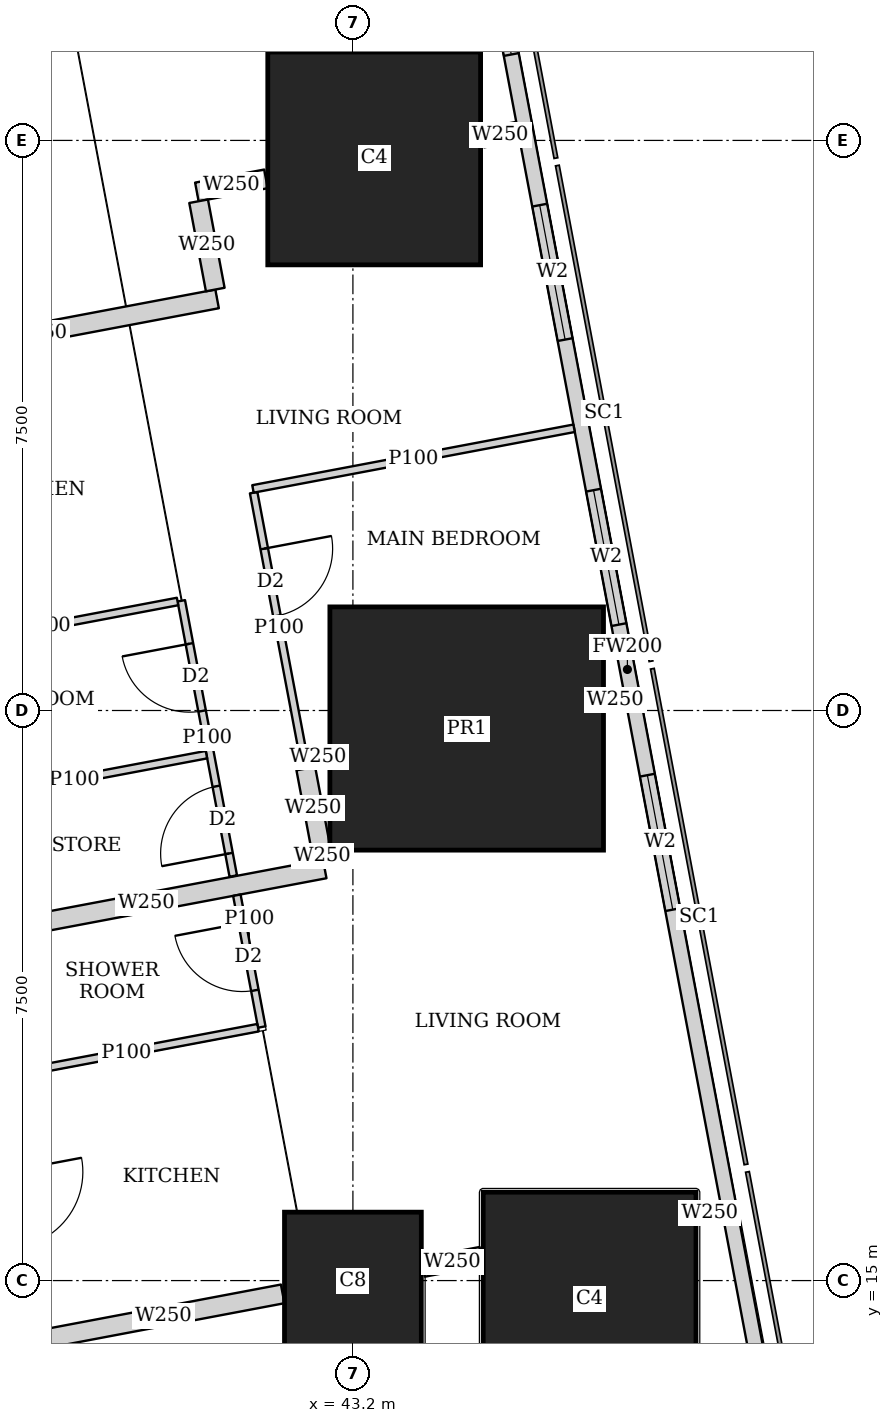
"""IFC4 building model, lengths in metres.
Left out: names, types, materials, properties, quantities, classifications, styles, units other than length and angle.
Written with IfcOpenShell. Run it as: python <this file> out.ifc"""

import sys

from ifc_helpers import new_model, si_unit, direction, frame, frame_2d, origin, origin_2d, place, context, subcontext, project, spatial, rectangle, extrude, element, fill, save


model = new_model("IFC4")
c1 = context("Model", 3, precision=1e-05, world=origin(), true_north=direction((0.0, 1.0)))
c2 = subcontext(c1, "Body", "Model", "MODEL_VIEW")
j1 = project(units=[si_unit("LENGTHUNIT", "METRE"), si_unit("PLANEANGLEUNIT", "RADIAN")], contexts=[c1])
p1 = place(None, origin())
s1 = spatial("IfcSite", under=j1, at=p1, CompositionType="ELEMENT")
p2 = place(p1, origin())
s2 = spatial("IfcBuilding", under=s1, at=p2, CompositionType="ELEMENT")
p3 = place(p2, frame((0.0, 0.0, 65.0)))
s3 = spatial("IfcBuildingStorey", under=s2, at=p3, CompositionType="ELEMENT", Elevation=65.0)
p4 = place(p3, frame((43.2, 15.0, 0.0), z_axis=(0.0, 0.0, 1.0), x_axis=(1.0, 0.0, 0.0)))
e1 = element("IfcColumn", 1, at=p4, inside=s3, PredefinedType="COLUMN", context=c2, shape_type="SweptSolid", body=[
    extrude(rectangle(XDim=1.8, YDim=1.8, at=origin_2d()), origin(), (0.0, 0.0, 1.0), 3.75),
])
p5 = place(p3, frame((46.314, 14.763, 0.0), z_axis=(0.0, 0.0, 1.0), x_axis=(1.0, 0.0, 0.0)))
e2 = element("IfcColumn", 2, at=p5, inside=s3, PredefinedType="COLUMN", context=c2, shape_type="SweptSolid", body=[
    extrude(rectangle(XDim=2.8, YDim=2.8, at=origin_2d()), origin(), (0.0, 0.0, 1.0), 3.75),
])
p6 = place(p3, frame((44.697, 22.263, 0.0), z_axis=(0.0, 0.0, 1.0), x_axis=(1.0, 0.0, 0.0)))
e3 = element("IfcColumn", 3, at=p6, inside=s3, PredefinedType="COLUMN", context=c2, shape_type="SweptSolid", body=[
    extrude(rectangle(XDim=3.6, YDim=3.2, at=origin_2d()), origin(), (0.0, 0.0, 1.0), 3.75),
])
p7 = place(p3, frame((43.48, 29.763, 0.0), z_axis=(0.0, 0.0, 1.0), x_axis=(1.0, 0.0, 0.0)))
e4 = element("IfcColumn", 4, at=p7, inside=s3, PredefinedType="COLUMN", context=c2, shape_type="SweptSolid", body=[
    extrude(rectangle(XDim=2.8, YDim=2.8, at=origin_2d()), origin(), (0.0, 0.0, 1.0), 3.75),
])
p8 = place(p3, frame((50.653, 2.703, 0.0), z_axis=(0.0, 0.0, 1.0), x_axis=(-0.185612026696, 0.982623109613, 0.0)))
e5 = element("IfcWall", 5, at=p8, inside=s3, PredefinedType="SOLIDWALL", context=c2, shape_type="SweptSolid", body=[
    extrude(rectangle(XDim=41.393, YDim=0.2, at=frame_2d((20.697, 0.0))), origin(), (0.0, 0.0, 1.0), 3.5),
])
p9 = place(p8, frame((1.633, 0.0, 0.9)))
e6 = element("IfcOpeningElement", 6, at=p9, cuts=e5, PredefinedType="OPENING", context=c2, shape_type="SweptSolid", body=[
    extrude(rectangle(XDim=1.8, YDim=1.5, at=frame_2d((0.9, 0.75))), frame((0.0, 0.11, 0.0), z_axis=(0.0, -1.0, 0.0), x_axis=(1.0, 0.0, 0.0)), (0.0, 0.0, 1.0), 0.22),
])
p10 = place(p8, frame((6.032, 0.0, 0.9)))
e7 = element("IfcOpeningElement", 7, at=p10, cuts=e5, PredefinedType="OPENING", context=c2, shape_type="SweptSolid", body=[
    extrude(rectangle(XDim=1.8, YDim=1.5, at=frame_2d((0.9, 0.75))), frame((0.0, 0.11, 0.0), z_axis=(0.0, -1.0, 0.0), x_axis=(1.0, 0.0, 0.0)), (0.0, 0.0, 1.0), 0.22),
])
p11 = place(p8, frame((9.848, 0.0, 0.9)))
e8 = element("IfcOpeningElement", 8, at=p11, cuts=e5, PredefinedType="OPENING", context=c2, shape_type="SweptSolid", body=[
    extrude(rectangle(XDim=1.8, YDim=1.5, at=frame_2d((0.9, 0.75))), frame((0.0, 0.11, 0.0), z_axis=(0.0, -1.0, 0.0), x_axis=(1.0, 0.0, 0.0)), (0.0, 0.0, 1.0), 0.22),
])
p12 = place(p8, frame((17.481, 0.0, 0.9)))
e9 = element("IfcOpeningElement", 9, at=p12, cuts=e5, PredefinedType="OPENING", context=c2, shape_type="SweptSolid", body=[
    extrude(rectangle(XDim=1.8, YDim=1.5, at=frame_2d((0.9, 0.75))), frame((0.0, 0.11, 0.0), z_axis=(0.0, -1.0, 0.0), x_axis=(1.0, 0.0, 0.0)), (0.0, 0.0, 1.0), 0.22),
])
p13 = place(p8, frame((21.297, 0.0, 0.9)))
e10 = element("IfcOpeningElement", 10, at=p13, cuts=e5, PredefinedType="OPENING", context=c2, shape_type="SweptSolid", body=[
    extrude(rectangle(XDim=1.8, YDim=1.5, at=frame_2d((0.9, 0.75))), frame((0.0, 0.11, 0.0), z_axis=(0.0, -1.0, 0.0), x_axis=(1.0, 0.0, 0.0)), (0.0, 0.0, 1.0), 0.22),
])
p14 = place(p8, frame((25.113, 0.0, 0.9)))
e11 = element("IfcOpeningElement", 11, at=p14, cuts=e5, PredefinedType="OPENING", context=c2, shape_type="SweptSolid", body=[
    extrude(rectangle(XDim=1.8, YDim=1.5, at=frame_2d((0.9, 0.75))), frame((0.0, 0.11, 0.0), z_axis=(0.0, -1.0, 0.0), x_axis=(1.0, 0.0, 0.0)), (0.0, 0.0, 1.0), 0.22),
])
p15 = place(p8, frame((28.93, 0.0, 0.9)))
e12 = element("IfcOpeningElement", 12, at=p15, cuts=e5, PredefinedType="OPENING", context=c2, shape_type="SweptSolid", body=[
    extrude(rectangle(XDim=1.8, YDim=1.5, at=frame_2d((0.9, 0.75))), frame((0.0, 0.11, 0.0), z_axis=(0.0, -1.0, 0.0), x_axis=(1.0, 0.0, 0.0)), (0.0, 0.0, 1.0), 0.22),
])
p16 = place(p8, frame((32.746, 0.0, 0.9)))
e13 = element("IfcOpeningElement", 13, at=p16, cuts=e5, PredefinedType="OPENING", context=c2, shape_type="SweptSolid", body=[
    extrude(rectangle(XDim=1.8, YDim=1.5, at=frame_2d((0.9, 0.75))), frame((0.0, 0.11, 0.0), z_axis=(0.0, -1.0, 0.0), x_axis=(1.0, 0.0, 0.0)), (0.0, 0.0, 1.0), 0.22),
])
p17 = place(p8, frame((36.481, 0.0, 0.9)))
e14 = element("IfcOpeningElement", 14, at=p17, cuts=e5, PredefinedType="OPENING", context=c2, shape_type="SweptSolid", body=[
    extrude(rectangle(XDim=1.8, YDim=1.5, at=frame_2d((0.9, 0.75))), frame((0.0, 0.11, 0.0), z_axis=(0.0, -1.0, 0.0), x_axis=(1.0, 0.0, 0.0)), (0.0, 0.0, 1.0), 0.22),
])
p18 = place(p3, frame((33.68, 42.723, 0.0), z_axis=(0.0, 0.0, 1.0), x_axis=(0.185624129307, -0.98262082342, 0.0)))
e15 = element("IfcWall", 15, at=p18, inside=s3, PredefinedType="SOLIDWALL", context=c2, shape_type="SweptSolid", body=[
    extrude(rectangle(XDim=41.051, YDim=0.15, at=frame_2d((20.526, 0.0))), origin(), (0.0, 0.0, 1.0), 2.5),
])
p19 = place(p18, frame((13.577, 0.0, 0.0)))
e16 = element("IfcOpeningElement", 16, at=p19, cuts=e15, PredefinedType="OPENING", context=c2, shape_type="SweptSolid", body=[
    extrude(rectangle(XDim=1.0, YDim=2.1, at=frame_2d((0.5, 1.05))), frame((0.0, 0.085, 0.0), z_axis=(0.0, -1.0, 0.0), x_axis=(1.0, 0.0, 0.0)), (0.0, 0.0, 1.0), 0.17),
])
p20 = place(p18, frame((17.394, 0.0, 0.0)))
e17 = element("IfcOpeningElement", 17, at=p20, cuts=e15, PredefinedType="OPENING", context=c2, shape_type="SweptSolid", body=[
    extrude(rectangle(XDim=1.0, YDim=2.1, at=frame_2d((0.5, 1.05))), frame((0.0, 0.085, 0.0), z_axis=(0.0, -1.0, 0.0), x_axis=(1.0, 0.0, 0.0)), (0.0, 0.0, 1.0), 0.17),
])
p21 = place(p18, frame((26.758, 0.0, 0.0)))
e18 = element("IfcOpeningElement", 18, at=p21, cuts=e15, PredefinedType="OPENING", context=c2, shape_type="SweptSolid", body=[
    extrude(rectangle(XDim=1.0, YDim=2.1, at=frame_2d((0.5, 1.05))), frame((0.0, 0.085, 0.0), z_axis=(0.0, -1.0, 0.0), x_axis=(1.0, 0.0, 0.0)), (0.0, 0.0, 1.0), 0.17),
])
p22 = place(p18, frame((32.193, 0.0, 0.0)))
e19 = element("IfcOpeningElement", 19, at=p22, cuts=e15, PredefinedType="OPENING", context=c2, shape_type="SweptSolid", body=[
    extrude(rectangle(XDim=1.0, YDim=2.1, at=frame_2d((0.5, 1.05))), frame((0.0, 0.085, 0.0), z_axis=(0.0, -1.0, 0.0), x_axis=(1.0, 0.0, 0.0)), (0.0, 0.0, 1.0), 0.17),
])
p23 = place(p3, frame((39.525, 31.443, 0.0), z_axis=(0.0, 0.0, 1.0), x_axis=(-0.982648035033, -0.185480023848, 0.0)))
e20 = element("IfcWall", 20, at=p23, inside=s3, PredefinedType="PARTITIONING", context=c2, shape_type="SweptSolid", body=[
    extrude(rectangle(XDim=3.575, YDim=0.1, at=frame_2d((1.788, 0.0))), origin(), (0.0, 0.0, 1.0), 3.5),
])
p24 = place(p3, frame((41.894, 25.366, 0.0), z_axis=(0.0, 0.0, 1.0), x_axis=(0.185611839851, -0.982623144907, 0.0)))
e21 = element("IfcWall", 21, at=p24, inside=s3, PredefinedType="PARTITIONING", context=c2, shape_type="SweptSolid", body=[
    extrude(rectangle(XDim=3.62, YDim=0.1, at=frame_2d((1.81, 0.0))), origin(), (0.0, 0.0, 1.0), 2.5),
])
p25 = place(p24, frame((0.75, 0.0, 0.0)))
e22 = element("IfcOpeningElement", 22, at=p25, cuts=e21, PredefinedType="OPENING", context=c2, shape_type="SweptSolid", body=[
    extrude(rectangle(XDim=0.9, YDim=2.1, at=frame_2d((0.45, 1.05))), frame((0.0, 0.06, 0.0), z_axis=(0.0, -1.0, 0.0), x_axis=(1.0, 0.0, 0.0)), (0.0, 0.0, 1.0), 0.12),
])
p26 = place(p3, frame((40.942, 23.943, 0.0), z_axis=(0.0, 0.0, 1.0), x_axis=(0.185632361754, -0.982619268216, 0.0)))
e23 = element("IfcWall", 23, at=p26, inside=s3, PredefinedType="PARTITIONING", context=c2, shape_type="SweptSolid", body=[
    extrude(rectangle(XDim=3.685, YDim=0.1, at=frame_2d((1.843, 0.0))), origin(), (0.0, 0.0, 1.0), 2.5),
])
p27 = place(p26, frame((0.575, 0.0, 0.0)))
e24 = element("IfcOpeningElement", 24, at=p27, cuts=e23, PredefinedType="OPENING", context=c2, shape_type="SweptSolid", body=[
    extrude(rectangle(XDim=0.9, YDim=2.1, at=frame_2d((0.45, 1.05))), frame((0.0, 0.06, 0.0), z_axis=(0.0, -1.0, 0.0), x_axis=(1.0, 0.0, 0.0)), (0.0, 0.0, 1.0), 0.12),
])
p28 = place(p26, frame((2.483, 0.0, 0.0)))
e25 = element("IfcOpeningElement", 25, at=p28, cuts=e23, PredefinedType="OPENING", context=c2, shape_type="SweptSolid", body=[
    extrude(rectangle(XDim=0.9, YDim=2.1, at=frame_2d((0.45, 1.05))), frame((0.0, 0.06, 0.0), z_axis=(0.0, -1.0, 0.0), x_axis=(1.0, 0.0, 0.0)), (0.0, 0.0, 1.0), 0.12),
])
p29 = place(p3, frame((46.11, 26.213, 0.0), z_axis=(0.0, 0.0, 1.0), x_axis=(-0.982633535512, -0.185556823879, 0.0)))
e26 = element("IfcWall", 26, at=p29, inside=s3, PredefinedType="PARTITIONING", context=c2, shape_type="SweptSolid", body=[
    extrude(rectangle(XDim=4.3, YDim=0.1, at=frame_2d((2.15, 0.0))), origin(), (0.0, 0.0, 1.0), 2.05),
])
p30 = place(p3, frame((40.893, 23.934, 0.0), z_axis=(0.0, 0.0, 1.0), x_axis=(-0.982588017646, -0.185797706064, 0.0)))
e27 = element("IfcWall", 27, at=p30, inside=s3, PredefinedType="PARTITIONING", context=c2, shape_type="SweptSolid", body=[
    extrude(rectangle(XDim=3.525, YDim=0.1, at=frame_2d((1.763, 0.0))), origin(), (0.0, 0.0, 1.0), 3.5),
])
p31 = place(p3, frame((41.273, 21.919, 0.0), z_axis=(0.0, 0.0, 1.0), x_axis=(-0.982636169624, -0.185542874149, 0.0)))
e28 = element("IfcWall", 28, at=p31, inside=s3, PredefinedType="PARTITIONING", context=c2, shape_type="SweptSolid", body=[
    extrude(rectangle(XDim=3.525, YDim=0.1, at=frame_2d((1.763, 0.0))), origin(), (0.0, 0.0, 1.0), 2.5),
])
p32 = place(p3, frame((45.372, 30.121, 0.0), z_axis=(0.0, 0.0, 1.0), x_axis=(-0.982352019699, -0.187041464366, 0.0)))
e29 = element("IfcWall", 29, at=p32, inside=s3, PredefinedType="SOLIDWALL", context=c2, shape_type="SweptSolid", body=[
    extrude(rectangle(XDim=0.476, YDim=0.25, at=frame_2d((0.238, 0.0))), origin(), (0.0, 0.0, 1.0), 3.5),
])
p33 = place(p3, frame((42.056, 29.494, 0.0), z_axis=(0.0, 0.0, 1.0), x_axis=(-0.982587178881, -0.185802141803, 0.0)))
e30 = element("IfcWall", 30, at=p33, inside=s3, PredefinedType="SOLIDWALL", context=c2, shape_type="SweptSolid", body=[
    extrude(rectangle(XDim=0.925, YDim=0.25, at=frame_2d((0.462, 0.0))), origin(), (0.0, 0.0, 1.0), 2.5),
])
p34 = place(p3, frame((41.413, 27.915, 0.0), z_axis=(0.0, 0.0, 1.0), x_axis=(-0.982635807605, -0.185544791394, 0.0)))
e31 = element("IfcWall", 31, at=p34, inside=s3, PredefinedType="SOLIDWALL", context=c2, shape_type="SweptSolid", body=[
    extrude(rectangle(XDim=4.775, YDim=0.25, at=frame_2d((2.388, 0.0))), origin(), (0.0, 0.0, 1.0), 3.5),
])
p35 = place(p3, frame((41.17, 29.2, 0.0), z_axis=(0.0, 0.0, 1.0), x_axis=(0.185223510709, -0.982696418575, 0.0)))
e32 = element("IfcWall", 32, at=p35, inside=s3, PredefinedType="SOLIDWALL", context=c2, shape_type="SweptSolid", body=[
    extrude(rectangle(XDim=1.182, YDim=0.25, at=frame_2d((0.591, 0.0))), origin(), (0.0, 0.0, 1.0), 2.5),
])
p36 = place(p3, frame((41.673, 20.07, 0.0), z_axis=(0.0, 0.0, 1.0), x_axis=(0.185783379659, -0.98259072652, 0.0)))
e33 = element("IfcWall", 33, at=p36, inside=s3, PredefinedType="PARTITIONING", context=c2, shape_type="SweptSolid", body=[
    extrude(rectangle(XDim=1.765, YDim=0.1, at=frame_2d((0.882, 0.0))), origin(), (0.0, 0.0, 1.0), 3.5),
])
p37 = place(p36, frame((0.374, 0.0, 0.0)))
e34 = element("IfcOpeningElement", 34, at=p37, cuts=e33, PredefinedType="OPENING", context=c2, shape_type="SweptSolid", body=[
    extrude(rectangle(XDim=0.9, YDim=2.1, at=frame_2d((0.45, 1.05))), frame((0.0, 0.06, 0.0), z_axis=(0.0, -1.0, 0.0), x_axis=(1.0, 0.0, 0.0)), (0.0, 0.0, 1.0), 0.12),
])
p38 = place(p3, frame((41.952, 18.327, 0.0), z_axis=(0.0, 0.0, 1.0), x_axis=(-0.982648794755, -0.185475998897, 0.0)))
e35 = element("IfcWall", 35, at=p38, inside=s3, PredefinedType="PARTITIONING", context=c2, shape_type="SweptSolid", body=[
    extrude(rectangle(XDim=3.525, YDim=0.1, at=frame_2d((1.763, 0.0))), origin(), (0.0, 0.0, 1.0), 3.5),
])
p39 = place(p3, frame((46.782, 22.657, 0.0), z_axis=(0.0, 0.0, 1.0), x_axis=(-0.982778390997, -0.18478807913, 0.0)))
e36 = element("IfcWall", 36, at=p39, inside=s3, PredefinedType="SOLIDWALL", context=c2, shape_type="SweptSolid", body=[
    extrude(rectangle(XDim=0.266, YDim=0.25, at=frame_2d((0.133, 0.0))), origin(), (0.0, 0.0, 1.0), 3.5),
])
p40 = place(p3, frame((42.873, 21.918, 0.0), z_axis=(0.0, 0.0, 1.0), x_axis=(-0.982892522967, -0.184180043152, 0.0)))
e37 = element("IfcWall", 37, at=p40, inside=s3, PredefinedType="SOLIDWALL", context=c2, shape_type="SweptSolid", body=[
    extrude(rectangle(XDim=0.272, YDim=0.25, at=frame_2d((0.136, 0.0))), origin(), (0.0, 0.0, 1.0), 2.5),
])
p41 = place(p3, frame((42.829, 20.416, 0.0), z_axis=(0.0, 0.0, 1.0), x_axis=(-0.982635807605, -0.185544791394, 0.0)))
e38 = element("IfcWall", 38, at=p41, inside=s3, PredefinedType="SOLIDWALL", context=c2, shape_type="SweptSolid", body=[
    extrude(rectangle(XDim=4.775, YDim=0.25, at=frame_2d((2.388, 0.0))), origin(), (0.0, 0.0, 1.0), 3.5),
])
p42 = place(p3, frame((42.58, 21.736, 0.0), z_axis=(0.0, 0.0, 1.0), x_axis=(0.185458925981, -0.982652017132, 0.0)))
e39 = element("IfcWall", 39, at=p42, inside=s3, PredefinedType="SOLIDWALL", context=c2, shape_type="SweptSolid", body=[
    extrude(rectangle(XDim=1.045, YDim=0.25, at=frame_2d((0.522, 0.0))), origin(), (0.0, 0.0, 1.0), 2.5),
])
p43 = place(p3, frame((42.787, 20.639, 0.0), z_axis=(0.0, 0.0, 1.0), x_axis=(0.185013851593, -0.982735913009, 0.0)))
e40 = element("IfcWall", 40, at=p43, inside=s3, PredefinedType="SOLIDWALL", context=c2, shape_type="SweptSolid", body=[
    extrude(rectangle(XDim=0.102, YDim=0.25, at=frame_2d((0.051, 0.0))), origin(), (0.0, 0.0, 1.0), 3.5),
])
p44 = place(p3, frame((48.055, 15.917, 0.0), z_axis=(0.0, 0.0, 1.0), x_axis=(-0.982510408223, -0.186207673669, 0.0)))
e41 = element("IfcWall", 41, at=p44, inside=s3, PredefinedType="SOLIDWALL", context=c2, shape_type="SweptSolid", body=[
    extrude(rectangle(XDim=0.323, YDim=0.25, at=frame_2d((0.161, 0.0))), origin(), (0.0, 0.0, 1.0), 3.5),
])
p45 = place(p3, frame((44.89, 15.319, 0.0), z_axis=(0.0, 0.0, 1.0), x_axis=(-0.982540856152, -0.186046945666, 0.0)))
e42 = element("IfcWall", 42, at=p45, inside=s3, PredefinedType="SOLIDWALL", context=c2, shape_type="SweptSolid", body=[
    extrude(rectangle(XDim=0.78, YDim=0.25, at=frame_2d((0.39, 0.0))), origin(), (0.0, 0.0, 1.0), 2.05),
])
p46 = place(p3, frame((42.276, 14.825, 0.0), z_axis=(0.0, 0.0, 1.0), x_axis=(-0.982607211054, -0.185696173318, 0.0)))
e43 = element("IfcWall", 43, at=p46, inside=s3, PredefinedType="SOLIDWALL", context=c2, shape_type="SweptSolid", body=[
    extrude(rectangle(XDim=3.194, YDim=0.25, at=frame_2d((1.597, 0.0))), origin(), (0.0, 0.0, 1.0), 3.5),
])
p47 = place(p12, origin())
e44 = element("IfcWindow", 44, at=p47, inside=s3, PartitioningType="SINGLE_PANEL", PredefinedType="WINDOW", context=c2, shape_type="SweptSolid", body=[
    extrude(rectangle(XDim=1.8, YDim=1.5, at=frame_2d((0.9, 0.75))), frame((0.0, 0.03, 0.0), z_axis=(0.0, -1.0, 0.0), x_axis=(1.0, 0.0, 0.0)), (0.0, 0.0, 1.0), 0.06),
])
fill(e9, e44)
p48 = place(p13, origin())
e45 = element("IfcWindow", 45, at=p48, inside=s3, PartitioningType="SINGLE_PANEL", PredefinedType="WINDOW", context=c2, shape_type="SweptSolid", body=[
    extrude(rectangle(XDim=1.8, YDim=1.5, at=frame_2d((0.9, 0.75))), frame((0.0, 0.03, 0.0), z_axis=(0.0, -1.0, 0.0), x_axis=(1.0, 0.0, 0.0)), (0.0, 0.0, 1.0), 0.06),
])
fill(e10, e45)
p49 = place(p14, origin())
e46 = element("IfcWindow", 46, at=p49, inside=s3, PartitioningType="SINGLE_PANEL", PredefinedType="WINDOW", context=c2, shape_type="SweptSolid", body=[
    extrude(rectangle(XDim=1.8, YDim=1.5, at=frame_2d((0.9, 0.75))), frame((0.0, 0.03, 0.0), z_axis=(0.0, -1.0, 0.0), x_axis=(1.0, 0.0, 0.0)), (0.0, 0.0, 1.0), 0.06),
])
fill(e11, e46)
p50 = place(p15, origin())
e47 = element("IfcWindow", 47, at=p50, inside=s3, PartitioningType="SINGLE_PANEL", PredefinedType="WINDOW", context=c2, shape_type="SweptSolid", body=[
    extrude(rectangle(XDim=1.8, YDim=1.5, at=frame_2d((0.9, 0.75))), frame((0.0, 0.03, 0.0), z_axis=(0.0, -1.0, 0.0), x_axis=(1.0, 0.0, 0.0)), (0.0, 0.0, 1.0), 0.06),
])
fill(e12, e47)
p51 = place(p25, origin())
e48 = element("IfcDoor", 48, at=p51, inside=s3, OperationType="SINGLE_SWING_LEFT", PredefinedType="DOOR", context=c2, shape_type="SweptSolid", body=[
    extrude(rectangle(XDim=0.9, YDim=2.1, at=frame_2d((0.45, 1.05))), frame((0.0, 0.025, 0.0), z_axis=(0.0, -1.0, 0.0), x_axis=(1.0, 0.0, 0.0)), (0.0, 0.0, 1.0), 0.05),
])
fill(e22, e48)
p52 = place(p27, origin())
e49 = element("IfcDoor", 49, at=p52, inside=s3, OperationType="SINGLE_SWING_RIGHT", PredefinedType="DOOR", context=c2, shape_type="SweptSolid", body=[
    extrude(rectangle(XDim=0.9, YDim=2.1, at=frame_2d((0.45, 1.05))), frame((0.0, 0.025, 0.0), z_axis=(0.0, -1.0, 0.0), x_axis=(1.0, 0.0, 0.0)), (0.0, 0.0, 1.0), 0.05),
])
fill(e24, e49)
p53 = place(p28, origin())
e50 = element("IfcDoor", 50, at=p53, inside=s3, OperationType="SINGLE_SWING_LEFT", PredefinedType="DOOR", context=c2, shape_type="SweptSolid", body=[
    extrude(rectangle(XDim=0.9, YDim=2.1, at=frame_2d((0.45, 1.05))), frame((0.0, 0.025, 0.0), z_axis=(0.0, -1.0, 0.0), x_axis=(1.0, 0.0, 0.0)), (0.0, 0.0, 1.0), 0.05),
])
fill(e25, e50)
p54 = place(p37, origin())
e51 = element("IfcDoor", 51, at=p54, inside=s3, OperationType="SINGLE_SWING_RIGHT", PredefinedType="DOOR", context=c2, shape_type="SweptSolid", body=[
    extrude(rectangle(XDim=0.9, YDim=2.1, at=frame_2d((0.45, 1.05))), frame((0.0, 0.025, 0.0), z_axis=(0.0, -1.0, 0.0), x_axis=(1.0, 0.0, 0.0)), (0.0, 0.0, 1.0), 0.05),
])
fill(e34, e51)
save(model, sys.argv[1])
